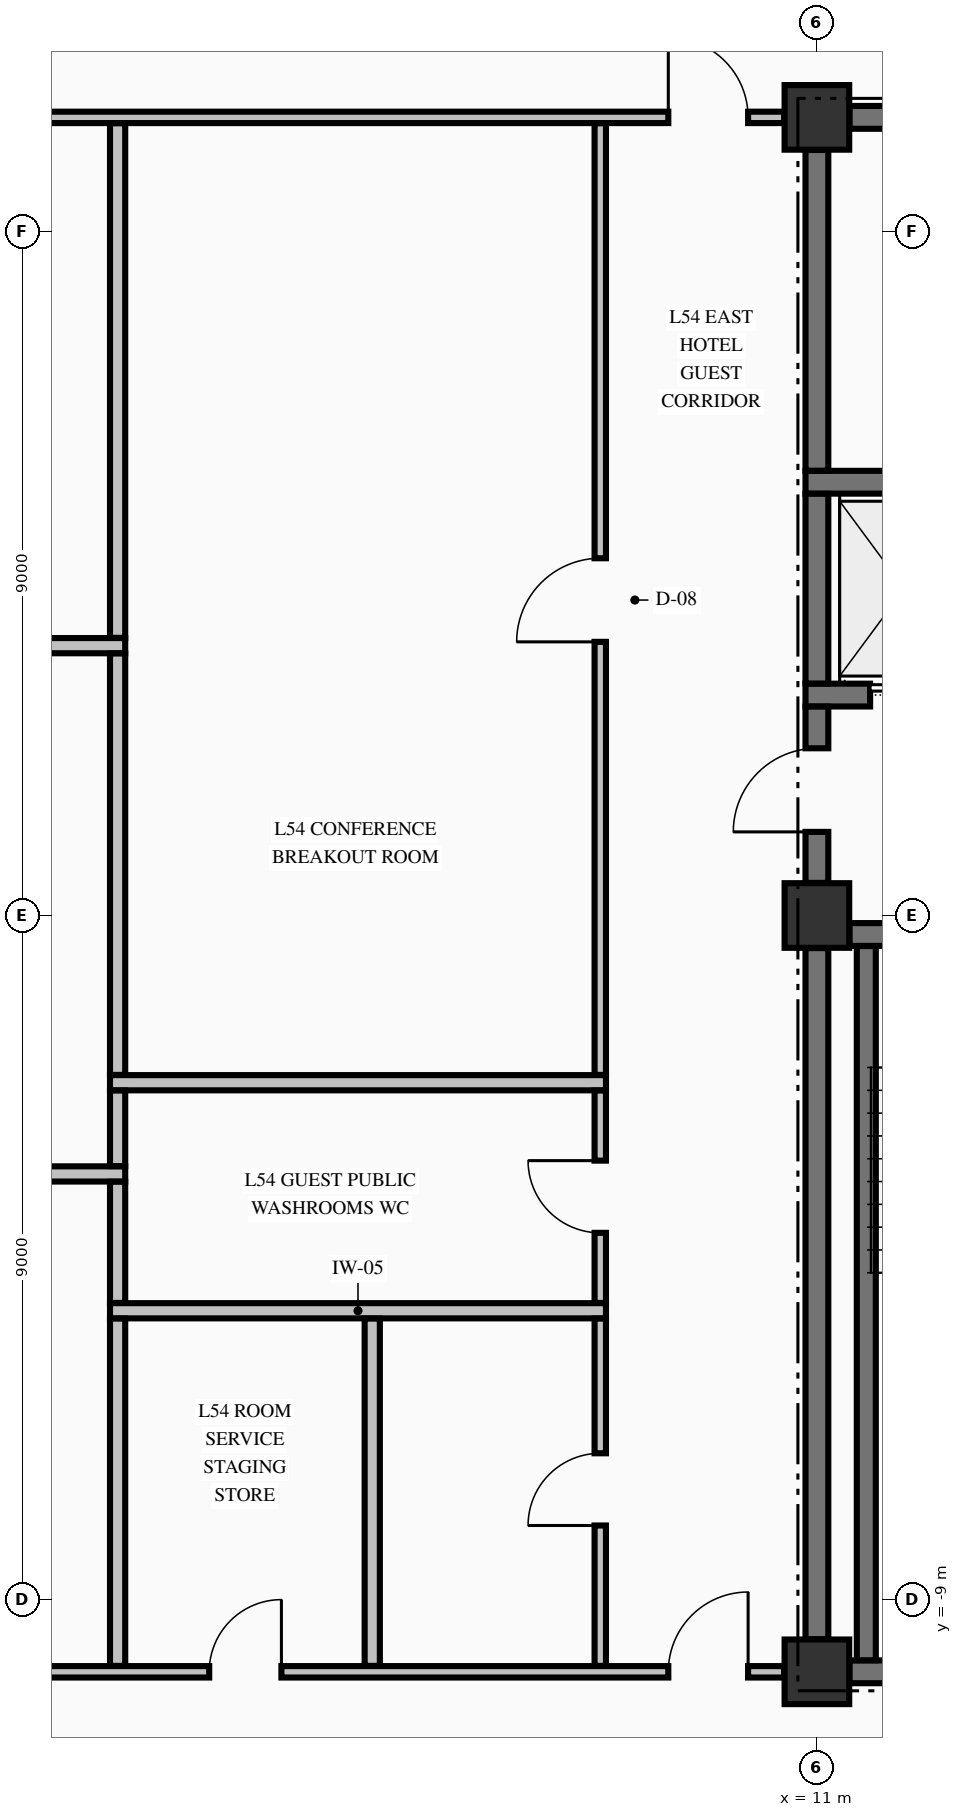
"""IFC4 building model, lengths in metres.
Left out: names, types, materials, properties, quantities, classifications, styles, units other than length and angle.
Written with IfcOpenShell. Run it as: python <this file> out.ifc"""

import sys

from ifc_helpers import new_model, si_unit, direction, frame, frame_2d, origin, origin_2d, place, context, subcontext, project, spatial, rectangle, extrude, element, fill, save


model = new_model("IFC4")
c1 = context("Model", 3, precision=1e-05, world=origin(), true_north=direction((0.0, 1.0)))
c2 = subcontext(c1, "Body", "Model", "MODEL_VIEW")
j1 = project(units=[si_unit("LENGTHUNIT", "METRE"), si_unit("PLANEANGLEUNIT", "RADIAN")], contexts=[c1])
p1 = place(None, origin())
s1 = spatial("IfcSite", under=j1, at=p1, CompositionType="ELEMENT")
p2 = place(p1, origin())
s2 = spatial("IfcBuilding", under=s1, at=p2, CompositionType="ELEMENT")
p3 = place(p2, frame((0.0, 0.0, 208.46)))
s3 = spatial("IfcBuildingStorey", under=s2, at=p3, CompositionType="ELEMENT", Elevation=208.46)
for number, where, z_axis, x_axis in (
    (1, (11.0, -9.95, -0.25), (0.0, 0.0, 1.0), (1.0, 0.0, 0.0)),
    (2, (11.0, 0.0, -0.25), (0.0, 0.0, 1.0), (1.0, 0.0, 0.0)),
    (3, (11.0, 10.5, -0.25), (0.0, 0.0, 1.0), (1.0, 0.0, 0.0)),
):
    element("IfcColumn", number, at=place(p3, frame(where, z_axis=z_axis, x_axis=x_axis)), inside=s3, PredefinedType="COLUMN", context=c2, shape_type="SweptSolid", body=[
        extrude(rectangle(XDim=0.85, YDim=0.85, at=origin_2d()), origin(), (0.0, 0.0, 1.0), 3.325),
    ])
p4 = place(p3, frame((11.429, -9.95, 0.0), z_axis=(0.0, 0.0, 1.0), x_axis=(1.0, 0.0, 0.0)))
e4 = element("IfcWall", 4, at=p4, inside=s3, PredefinedType="SHEAR", context=c2, shape_type="SweptSolid", body=[
    extrude(rectangle(XDim=3.271, YDim=0.3, at=frame_2d((1.635, 0.0))), origin(), (0.0, 0.0, 1.0), 3.075),
])
p5 = place(p3, frame((11.429, -0.25, 0.0), z_axis=(0.0, 0.0, 1.0), x_axis=(1.0, 0.0, 0.0)))
e5 = element("IfcWall", 5, at=p5, inside=s3, PredefinedType="SHEAR", context=c2, shape_type="SweptSolid", body=[
    extrude(rectangle(XDim=3.446, YDim=0.3, at=frame_2d((1.723, 0.0))), origin(), (0.0, 0.0, 1.0), 3.075),
])
p6 = place(p5, frame((1.171, 0.0, 0.0)))
e6 = element("IfcOpeningElement", 6, at=p6, cuts=e5, PredefinedType="OPENING", context=c2, shape_type="SweptSolid", body=[
    extrude(rectangle(XDim=1.1, YDim=2.15, at=frame_2d((0.55, 1.075))), frame((0.0, 0.16, 0.0), z_axis=(0.0, -1.0, 0.0), x_axis=(1.0, 0.0, 0.0)), (0.0, 0.0, 1.0), 0.32),
])
p7 = place(p3, frame((10.85, 2.9, 0.0), z_axis=(0.0, 0.0, 1.0), x_axis=(1.0, 0.0, 0.0)))
e7 = element("IfcWall", 7, at=p7, inside=s3, PredefinedType="SHEAR", context=c2, shape_type="SweptSolid", body=[
    extrude(rectangle(XDim=4.025, YDim=0.3, at=frame_2d((2.012, 0.0))), origin(), (0.0, 0.0, 1.0), 3.075),
])
p8 = place(p7, frame((0.85, 0.0, 0.0)))
e8 = element("IfcOpeningElement", 8, at=p8, cuts=e7, PredefinedType="OPENING", context=c2, shape_type="SweptSolid", body=[
    extrude(rectangle(XDim=1.1, YDim=2.2, at=frame_2d((0.55, 1.1))), frame((0.0, 0.16, 0.0), z_axis=(0.0, -1.0, 0.0), x_axis=(1.0, 0.0, 0.0)), (0.0, 0.0, 1.0), 0.32),
])
p9 = place(p3, frame((10.85, 5.7, 0.0), z_axis=(0.0, 0.0, 1.0), x_axis=(1.0, 0.0, 0.0)))
e9 = element("IfcWall", 9, at=p9, inside=s3, PredefinedType="SHEAR", context=c2, shape_type="SweptSolid", body=[
    extrude(rectangle(XDim=4.025, YDim=0.3, at=frame_2d((2.012, 0.0))), origin(), (0.0, 0.0, 1.0), 3.075),
])
p10 = place(p3, frame((11.429, 10.5, 0.0), z_axis=(0.0, 0.0, 1.0), x_axis=(1.0, 0.0, 0.0)))
e10 = element("IfcWall", 10, at=p10, inside=s3, PredefinedType="SHEAR", context=c2, shape_type="SweptSolid", body=[
    extrude(rectangle(XDim=3.271, YDim=0.3, at=frame_2d((1.635, 0.0))), origin(), (0.0, 0.0, 1.0), 3.075),
])
p11 = place(p10, frame((1.546, 0.0, 0.0)))
e11 = element("IfcOpeningElement", 11, at=p11, cuts=e10, PredefinedType="OPENING", context=c2, shape_type="SweptSolid", body=[
    extrude(rectangle(XDim=0.95, YDim=2.15, at=frame_2d((0.475, 1.075))), frame((0.0, 0.16, 0.0), z_axis=(0.0, -1.0, 0.0), x_axis=(1.0, 0.0, 0.0)), (0.0, 0.0, 1.0), 0.32),
])
p12 = place(p3, frame((-10.569, -9.95, 0.0), z_axis=(0.0, 0.0, 1.0), x_axis=(1.0, 0.0, 0.0)))
e12 = element("IfcWall", 12, at=p12, inside=s3, PredefinedType="PARTITIONING", context=c2, shape_type="SweptSolid", body=[
    extrude(rectangle(XDim=21.138, YDim=0.15, at=frame_2d((10.569, 0.0))), origin(), (0.0, 0.0, 1.0), 3.075),
])
p13 = place(p12, frame((0.474, 0.0, 0.0)))
e13 = element("IfcOpeningElement", 13, at=p13, cuts=e12, PredefinedType="OPENING", context=c2, shape_type="SweptSolid", body=[
    extrude(rectangle(XDim=1.05, YDim=2.15, at=frame_2d((0.525, 1.075))), frame((0.0, 0.085, 0.0), z_axis=(0.0, -1.0, 0.0), x_axis=(1.0, 0.0, 0.0)), (0.0, 0.0, 1.0), 0.17),
])
p14 = place(p12, frame((19.614, 0.0, 0.0)))
e14 = element("IfcOpeningElement", 14, at=p14, cuts=e12, PredefinedType="OPENING", context=c2, shape_type="SweptSolid", body=[
    extrude(rectangle(XDim=1.05, YDim=2.15, at=frame_2d((0.525, 1.075))), frame((0.0, 0.085, 0.0), z_axis=(0.0, -1.0, 0.0), x_axis=(1.0, 0.0, 0.0)), (0.0, 0.0, 1.0), 0.17),
])
p15 = place(p12, frame((13.574, 0.0, 0.0)))
e15 = element("IfcOpeningElement", 15, at=p15, cuts=e12, PredefinedType="OPENING", context=c2, shape_type="SweptSolid", body=[
    extrude(rectangle(XDim=0.95, YDim=2.15, at=frame_2d((0.475, 1.075))), frame((0.0, 0.085, 0.0), z_axis=(0.0, -1.0, 0.0), x_axis=(1.0, 0.0, 0.0)), (0.0, 0.0, 1.0), 0.17),
])
p16 = place(p3, frame((1.7, -5.2, 0.0), z_axis=(0.0, 0.0, 1.0), x_axis=(1.0, 0.0, 0.0)))
e16 = element("IfcWall", 16, at=p16, inside=s3, PredefinedType="PARTITIONING", context=c2, shape_type="SweptSolid", body=[
    extrude(rectangle(XDim=6.525, YDim=0.2, at=frame_2d((3.263, 0.0))), origin(), (0.0, 0.0, 1.0), 3.075),
])
p17 = place(p3, frame((-8.225, -3.4, 0.0), z_axis=(0.0, 0.0, 1.0), x_axis=(1.0, 0.0, 0.0)))
e17 = element("IfcWall", 17, at=p17, inside=s3, PredefinedType="PARTITIONING", context=c2, shape_type="SweptSolid", body=[
    extrude(rectangle(XDim=10.125, YDim=0.2, at=frame_2d((5.062, 0.0))), origin(), (0.0, 0.0, 1.0), 3.075),
])
p18 = place(p3, frame((1.7, -2.2, 0.0), z_axis=(0.0, 0.0, 1.0), x_axis=(1.0, 0.0, 0.0)))
e18 = element("IfcWall", 18, at=p18, inside=s3, PredefinedType="PARTITIONING", context=c2, shape_type="SweptSolid", body=[
    extrude(rectangle(XDim=6.525, YDim=0.2, at=frame_2d((3.263, 0.0))), origin(), (0.0, 0.0, 1.0), 3.075),
])
p19 = place(p3, frame((-8.225, 3.55, 0.0), z_axis=(0.0, 0.0, 1.0), x_axis=(1.0, 0.0, 0.0)))
e19 = element("IfcWall", 19, at=p19, inside=s3, PredefinedType="PARTITIONING", context=c2, shape_type="SweptSolid", body=[
    extrude(rectangle(XDim=10.125, YDim=0.2, at=frame_2d((5.062, 0.0))), origin(), (0.0, 0.0, 1.0), 3.075),
])
p20 = place(p3, frame((-10.569, 10.5, 0.0), z_axis=(0.0, 0.0, 1.0), x_axis=(1.0, 0.0, 0.0)))
e20 = element("IfcWall", 20, at=p20, inside=s3, PredefinedType="PARTITIONING", context=c2, shape_type="SweptSolid", body=[
    extrude(rectangle(XDim=21.138, YDim=0.15, at=frame_2d((10.569, 0.0))), origin(), (0.0, 0.0, 1.0), 3.075),
])
p21 = place(p20, frame((0.474, 0.0, 0.0)))
e21 = element("IfcOpeningElement", 21, at=p21, cuts=e20, PredefinedType="OPENING", context=c2, shape_type="SweptSolid", body=[
    extrude(rectangle(XDim=1.05, YDim=2.15, at=frame_2d((0.525, 1.075))), frame((0.0, 0.085, 0.0), z_axis=(0.0, -1.0, 0.0), x_axis=(1.0, 0.0, 0.0)), (0.0, 0.0, 1.0), 0.17),
])
p22 = place(p20, frame((19.614, 0.0, 0.0)))
e22 = element("IfcOpeningElement", 22, at=p22, cuts=e20, PredefinedType="OPENING", context=c2, shape_type="SweptSolid", body=[
    extrude(rectangle(XDim=1.05, YDim=2.15, at=frame_2d((0.525, 1.075))), frame((0.0, 0.085, 0.0), z_axis=(0.0, -1.0, 0.0), x_axis=(1.0, 0.0, 0.0)), (0.0, 0.0, 1.0), 0.17),
])
p23 = place(p3, frame((11.0, -9.521, 0.0), z_axis=(0.0, 0.0, 1.0), x_axis=(0.0, 1.0, 0.0)))
e23 = element("IfcWall", 23, at=p23, inside=s3, PredefinedType="SHEAR", context=c2, shape_type="SweptSolid", body=[
    extrude(rectangle(XDim=9.092, YDim=0.3, at=frame_2d((4.546, 0.0))), origin(), (0.0, 0.0, 1.0), 3.075),
])
p24 = place(p3, frame((11.0, 0.429, 0.0), z_axis=(0.0, 0.0, 1.0), x_axis=(0.0, 1.0, 0.0)))
e24 = element("IfcWall", 24, at=p24, inside=s3, PredefinedType="SHEAR", context=c2, shape_type="SweptSolid", body=[
    extrude(rectangle(XDim=2.319, YDim=0.3, at=frame_2d((1.16, 0.0))), origin(), (0.0, 0.0, 1.0), 3.075),
])
p25 = place(p24, frame((0.671, 0.0, 0.0)))
e25 = element("IfcOpeningElement", 25, at=p25, cuts=e24, PredefinedType="OPENING", context=c2, shape_type="SweptSolid", body=[
    extrude(rectangle(XDim=1.1, YDim=2.15, at=frame_2d((0.55, 1.075))), frame((0.0, 0.16, 0.0), z_axis=(0.0, -1.0, 0.0), x_axis=(1.0, 0.0, 0.0)), (0.0, 0.0, 1.0), 0.32),
])
p26 = place(p3, frame((11.0, 3.052, 0.0), z_axis=(0.0, 0.0, 1.0), x_axis=(0.0, 1.0, 0.0)))
e26 = element("IfcWall", 26, at=p26, inside=s3, PredefinedType="SHEAR", context=c2, shape_type="SweptSolid", body=[
    extrude(rectangle(XDim=2.496, YDim=0.3, at=frame_2d((1.248, 0.0))), origin(), (0.0, 0.0, 1.0), 3.075),
])
p27 = place(p3, frame((11.0, 5.852, 0.0), z_axis=(0.0, 0.0, 1.0), x_axis=(0.0, 1.0, 0.0)))
e27 = element("IfcWall", 27, at=p27, inside=s3, PredefinedType="SHEAR", context=c2, shape_type="SweptSolid", body=[
    extrude(rectangle(XDim=4.219, YDim=0.3, at=frame_2d((2.109, 0.0))), origin(), (0.0, 0.0, 1.0), 3.075),
])
p28 = place(p3, frame((11.65, -9.798, 0.0), z_axis=(0.0, 0.0, 1.0), x_axis=(0.0, 1.0, 0.0)))
e28 = element("IfcWall", 28, at=p28, inside=s3, PredefinedType="SOLIDWALL", context=c2, shape_type="SweptSolid", body=[
    extrude(rectangle(XDim=9.396, YDim=0.25, at=frame_2d((4.698, 0.0))), origin(), (0.0, 0.0, 1.0), 3.075),
])
p29 = place(p3, frame((1.8, -9.872, 0.0), z_axis=(0.0, 0.0, 1.0), x_axis=(0.0, 1.0, 0.0)))
e29 = element("IfcWall", 29, at=p29, inside=s3, PredefinedType="PARTITIONING", context=c2, shape_type="SweptSolid", body=[
    extrude(rectangle(XDim=4.569, YDim=0.2, at=frame_2d((2.285, 0.0))), origin(), (0.0, 0.0, 1.0), 3.075),
])
p30 = place(p3, frame((1.8, -5.097, 0.0), z_axis=(0.0, 0.0, 1.0), x_axis=(0.0, 1.0, 0.0)))
e30 = element("IfcWall", 30, at=p30, inside=s3, PredefinedType="PARTITIONING", context=c2, shape_type="SweptSolid", body=[
    extrude(rectangle(XDim=1.594, YDim=0.2, at=frame_2d((0.797, 0.0))), origin(), (0.0, 0.0, 1.0), 3.075),
])
p31 = place(p3, frame((1.8, -3.297, 0.0), z_axis=(0.0, 0.0, 1.0), x_axis=(0.0, 1.0, 0.0)))
e31 = element("IfcWall", 31, at=p31, inside=s3, PredefinedType="PARTITIONING", context=c2, shape_type="SweptSolid", body=[
    extrude(rectangle(XDim=0.994, YDim=0.2, at=frame_2d((0.497, 0.0))), origin(), (0.0, 0.0, 1.0), 3.075),
])
p32 = place(p3, frame((1.8, -2.097, 0.0), z_axis=(0.0, 0.0, 1.0), x_axis=(0.0, 1.0, 0.0)))
e32 = element("IfcWall", 32, at=p32, inside=s3, PredefinedType="PARTITIONING", context=c2, shape_type="SweptSolid", body=[
    extrude(rectangle(XDim=5.544, YDim=0.2, at=frame_2d((2.772, 0.0))), origin(), (0.0, 0.0, 1.0), 3.075),
])
p33 = place(p3, frame((1.8, 3.653, 0.0), z_axis=(0.0, 0.0, 1.0), x_axis=(0.0, 1.0, 0.0)))
e33 = element("IfcWall", 33, at=p33, inside=s3, PredefinedType="PARTITIONING", context=c2, shape_type="SweptSolid", body=[
    extrude(rectangle(XDim=6.769, YDim=0.2, at=frame_2d((3.385, 0.0))), origin(), (0.0, 0.0, 1.0), 3.075),
])
p34 = place(p3, frame((5.15, -9.872, 0.0), z_axis=(0.0, 0.0, 1.0), x_axis=(0.0, 1.0, 0.0)))
e34 = element("IfcWall", 34, at=p34, inside=s3, PredefinedType="PARTITIONING", context=c2, shape_type="SweptSolid", body=[
    extrude(rectangle(XDim=4.569, YDim=0.2, at=frame_2d((2.285, 0.0))), origin(), (0.0, 0.0, 1.0), 3.075),
])
p35 = place(p3, frame((8.15, -9.872, 0.0), z_axis=(0.0, 0.0, 1.0), x_axis=(0.0, 1.0, 0.0)))
e35 = element("IfcWall", 35, at=p35, inside=s3, PredefinedType="PARTITIONING", context=c2, shape_type="SweptSolid", body=[
    extrude(rectangle(XDim=4.569, YDim=0.15, at=frame_2d((2.285, 0.0))), origin(), (0.0, 0.0, 1.0), 3.075),
])
p36 = place(p35, frame((1.847, 0.0, 0.0)))
e36 = element("IfcOpeningElement", 36, at=p36, cuts=e35, PredefinedType="OPENING", context=c2, shape_type="SweptSolid", body=[
    extrude(rectangle(XDim=0.95, YDim=2.15, at=frame_2d((0.475, 1.075))), frame((0.0, 0.085, 0.0), z_axis=(0.0, -1.0, 0.0), x_axis=(1.0, 0.0, 0.0)), (0.0, 0.0, 1.0), 0.17),
])
p37 = place(p3, frame((8.15, -5.097, 0.0), z_axis=(0.0, 0.0, 1.0), x_axis=(0.0, 1.0, 0.0)))
e37 = element("IfcWall", 37, at=p37, inside=s3, PredefinedType="PARTITIONING", context=c2, shape_type="SweptSolid", body=[
    extrude(rectangle(XDim=2.794, YDim=0.15, at=frame_2d((1.397, 0.0))), origin(), (0.0, 0.0, 1.0), 3.075),
])
p38 = place(p37, frame((0.922, 0.0, 0.0)))
e38 = element("IfcOpeningElement", 38, at=p38, cuts=e37, PredefinedType="OPENING", context=c2, shape_type="SweptSolid", body=[
    extrude(rectangle(XDim=0.95, YDim=2.15, at=frame_2d((0.475, 1.075))), frame((0.0, 0.085, 0.0), z_axis=(0.0, -1.0, 0.0), x_axis=(1.0, 0.0, 0.0)), (0.0, 0.0, 1.0), 0.17),
])
p39 = place(p3, frame((8.15, -2.097, 0.0), z_axis=(0.0, 0.0, 1.0), x_axis=(0.0, 1.0, 0.0)))
e39 = element("IfcWall", 39, at=p39, inside=s3, PredefinedType="PARTITIONING", context=c2, shape_type="SweptSolid", body=[
    extrude(rectangle(XDim=12.519, YDim=0.15, at=frame_2d((6.26, 0.0))), origin(), (0.0, 0.0, 1.0), 3.075),
])
p40 = place(p39, frame((5.697, 0.0, 0.0)))
e40 = element("IfcOpeningElement", 40, at=p40, cuts=e39, PredefinedType="OPENING", context=c2, shape_type="SweptSolid", body=[
    extrude(rectangle(XDim=1.1, YDim=2.15, at=frame_2d((0.55, 1.075))), frame((0.0, 0.085, 0.0), z_axis=(0.0, -1.0, 0.0), x_axis=(1.0, 0.0, 0.0)), (0.0, 0.0, 1.0), 0.17),
])
p41 = place(p25, origin())
e41 = element("IfcDoor", 41, at=p41, inside=s3, OperationType="SINGLE_SWING_LEFT", PredefinedType="DOOR", context=c2, shape_type="SweptSolid", body=[
    extrude(rectangle(XDim=1.1, YDim=2.15, at=frame_2d((0.55, 1.075))), frame((0.0, 0.025, 0.0), z_axis=(0.0, -1.0, 0.0), x_axis=(1.0, 0.0, 0.0)), (0.0, 0.0, 1.0), 0.05),
])
fill(e25, e41)
p42 = place(p8, origin())
e42 = element("IfcDoor", 42, at=p42, inside=s3, OperationType="SLIDING_TO_RIGHT", PredefinedType="DOOR", context=c2, shape_type="SweptSolid", body=[
    extrude(rectangle(XDim=1.1, YDim=2.2, at=frame_2d((0.55, 1.1))), frame((0.0, 0.025, 0.0), z_axis=(0.0, -1.0, 0.0), x_axis=(1.0, 0.0, 0.0)), (0.0, 0.0, 1.0), 0.05),
])
fill(e8, e42)
p43 = place(p22, origin())
e43 = element("IfcDoor", 43, at=p43, inside=s3, OperationType="SINGLE_SWING_LEFT", PredefinedType="DOOR", context=c2, shape_type="SweptSolid", body=[
    extrude(rectangle(XDim=1.05, YDim=2.15, at=frame_2d((0.525, 1.075))), frame((0.0, 0.025, 0.0), z_axis=(0.0, -1.0, 0.0), x_axis=(1.0, 0.0, 0.0)), (0.0, 0.0, 1.0), 0.05),
])
fill(e22, e43)
p44 = place(p14, origin())
e44 = element("IfcDoor", 44, at=p44, inside=s3, OperationType="SINGLE_SWING_RIGHT", PredefinedType="DOOR", context=c2, shape_type="SweptSolid", body=[
    extrude(rectangle(XDim=1.05, YDim=2.15, at=frame_2d((0.525, 1.075))), frame((0.0, 0.025, 0.0), z_axis=(0.0, -1.0, 0.0), x_axis=(1.0, 0.0, 0.0)), (0.0, 0.0, 1.0), 0.05),
])
fill(e14, e44)
p45 = place(p40, origin())
e45 = element("IfcDoor", 45, at=p45, inside=s3, OperationType="SINGLE_SWING_LEFT", PredefinedType="DOOR", context=c2, shape_type="SweptSolid", body=[
    extrude(rectangle(XDim=1.1, YDim=2.15, at=frame_2d((0.55, 1.075))), frame((0.0, 0.025, 0.0), z_axis=(0.0, -1.0, 0.0), x_axis=(1.0, 0.0, 0.0)), (0.0, 0.0, 1.0), 0.05),
])
fill(e40, e45)
p46 = place(p38, origin())
e46 = element("IfcDoor", 46, at=p46, inside=s3, OperationType="SINGLE_SWING_RIGHT", PredefinedType="DOOR", context=c2, shape_type="SweptSolid", body=[
    extrude(rectangle(XDim=0.95, YDim=2.15, at=frame_2d((0.475, 1.075))), frame((0.0, 0.025, 0.0), z_axis=(0.0, -1.0, 0.0), x_axis=(1.0, 0.0, 0.0)), (0.0, 0.0, 1.0), 0.05),
])
fill(e38, e46)
p47 = place(p36, origin())
e47 = element("IfcDoor", 47, at=p47, inside=s3, OperationType="SINGLE_SWING_LEFT", PredefinedType="DOOR", context=c2, shape_type="SweptSolid", body=[
    extrude(rectangle(XDim=0.95, YDim=2.15, at=frame_2d((0.475, 1.075))), frame((0.0, 0.025, 0.0), z_axis=(0.0, -1.0, 0.0), x_axis=(1.0, 0.0, 0.0)), (0.0, 0.0, 1.0), 0.05),
])
fill(e36, e47)
p48 = place(p15, origin())
e48 = element("IfcDoor", 48, at=p48, inside=s3, OperationType="SINGLE_SWING_RIGHT", PredefinedType="DOOR", context=c2, shape_type="SweptSolid", body=[
    extrude(rectangle(XDim=0.95, YDim=2.15, at=frame_2d((0.475, 1.075))), frame((0.0, 0.025, 0.0), z_axis=(0.0, -1.0, 0.0), x_axis=(1.0, 0.0, 0.0)), (0.0, 0.0, 1.0), 0.05),
])
fill(e15, e48)
save(model, sys.argv[1])
